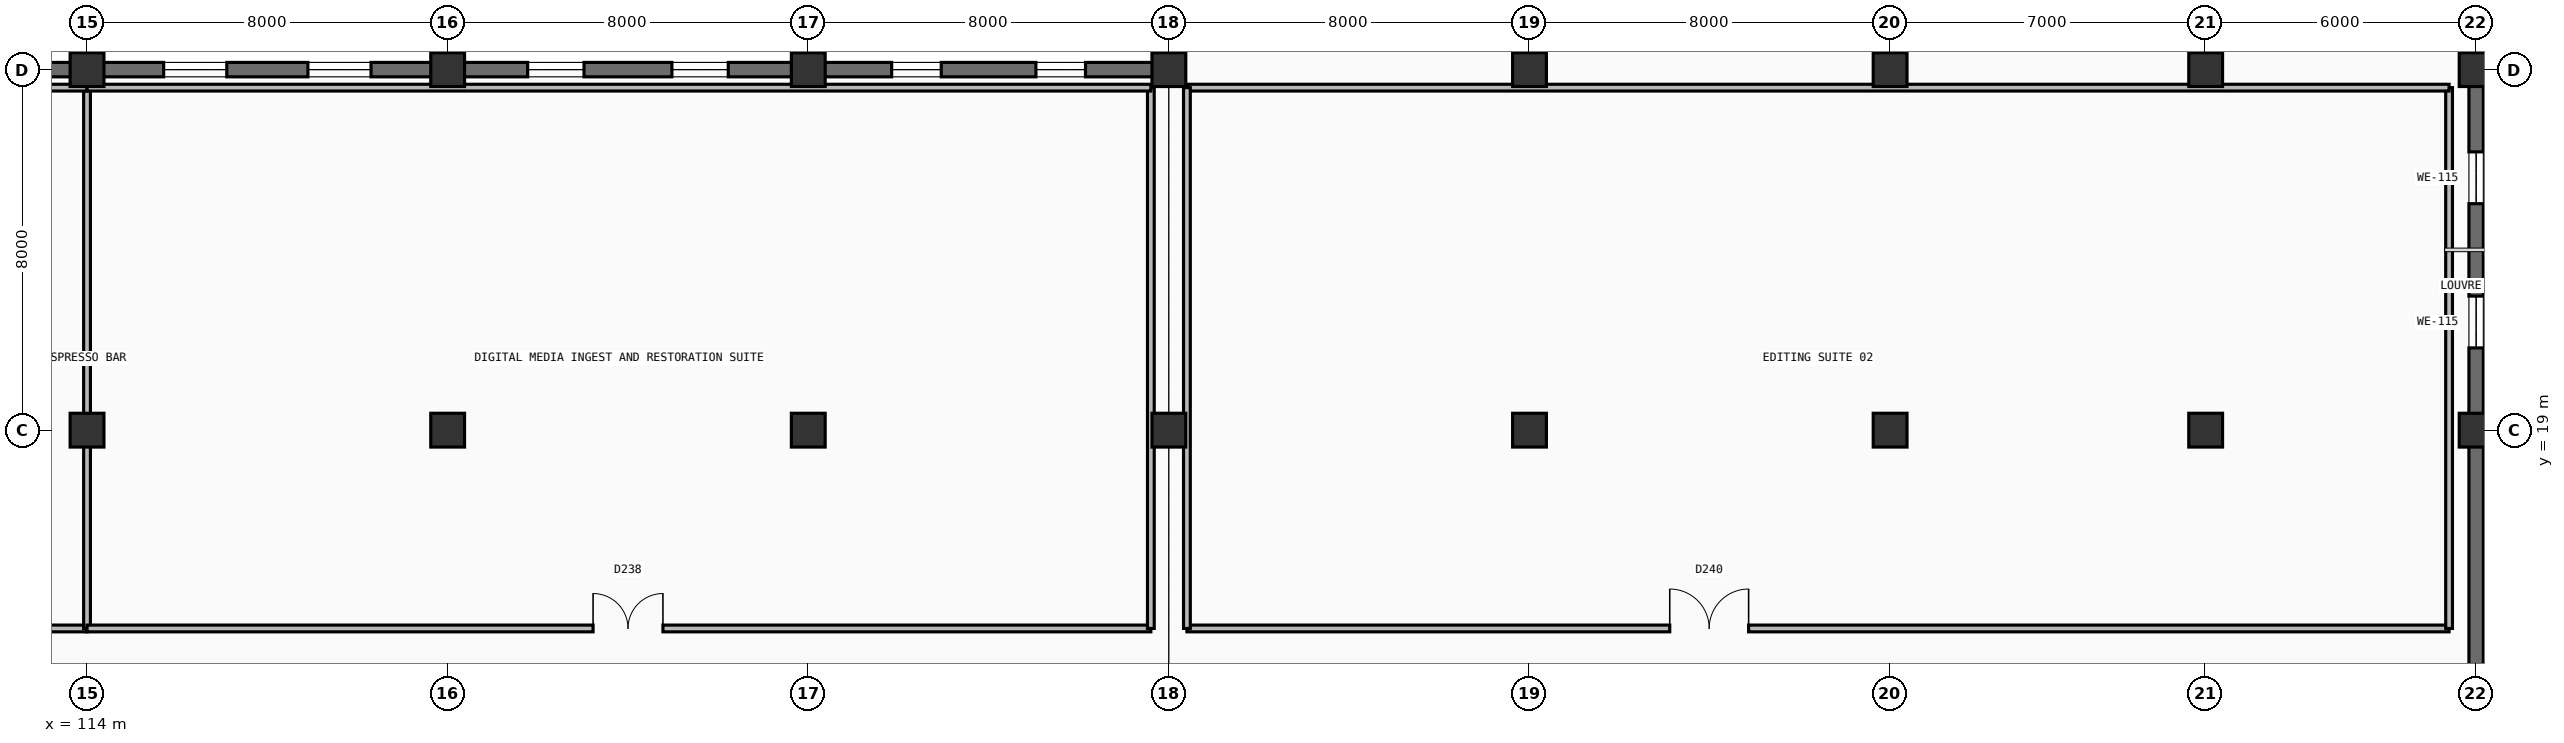
"""IFC4 building model, lengths in metres.
Left out: names, types, materials, properties, quantities, classifications, styles, units other than length and angle.
Written with IfcOpenShell. Run it as: python <this file> out.ifc"""

import sys

from ifc_helpers import new_model, si_unit, direction, frame, frame_2d, origin, origin_2d, place, context, subcontext, project, spatial, rectangle, extrude, element, fill, save


model = new_model("IFC4")
c1 = context("Model", 3, precision=1e-05, world=origin(), true_north=direction((0.0, 1.0)))
c2 = subcontext(c1, "Body", "Model", "MODEL_VIEW")
j1 = project(units=[si_unit("LENGTHUNIT", "METRE"), si_unit("PLANEANGLEUNIT", "RADIAN")], contexts=[c1])
p1 = place(None, origin())
s1 = spatial("IfcSite", under=j1, at=p1, CompositionType="ELEMENT")
p2 = place(p1, origin())
s2 = spatial("IfcBuilding", under=s1, at=p2, CompositionType="ELEMENT")
p3 = place(p2, origin())
s3 = spatial("IfcBuildingStorey", under=s2, at=p3, CompositionType="ELEMENT", Elevation=0.0)
for number, where, z_axis, x_axis in (
    (1, (114.0, 19.0, 0.0), (0.0, 0.0, 1.0), (1.0, 0.0, 0.0)),
    (2, (114.0, 27.0, 0.0), (0.0, 0.0, 1.0), (1.0, 0.0, 0.0)),
    (3, (122.0, 19.0, 0.0), (0.0, 0.0, 1.0), (1.0, 0.0, 0.0)),
    (4, (122.0, 27.0, 0.0), (0.0, 0.0, 1.0), (1.0, 0.0, 0.0)),
    (5, (130.0, 19.0, 0.0), (0.0, 0.0, 1.0), (1.0, 0.0, 0.0)),
    (6, (130.0, 27.0, 0.0), (0.0, 0.0, 1.0), (1.0, 0.0, 0.0)),
    (7, (138.0, 19.0, 0.0), (0.0, 0.0, 1.0), (1.0, 0.0, 0.0)),
    (8, (138.0, 27.0, 0.0), (0.0, 0.0, 1.0), (1.0, 0.0, 0.0)),
    (9, (146.0, 19.0, 0.0), (0.0, 0.0, 1.0), (1.0, 0.0, 0.0)),
    (10, (146.0, 27.0, 0.0), (0.0, 0.0, 1.0), (1.0, 0.0, 0.0)),
    (11, (154.0, 19.0, 0.0), (0.0, 0.0, 1.0), (1.0, 0.0, 0.0)),
    (12, (154.0, 27.0, 0.0), (0.0, 0.0, 1.0), (1.0, 0.0, 0.0)),
    (13, (161.0, 19.0, 0.0), (0.0, 0.0, 1.0), (1.0, 0.0, 0.0)),
    (14, (161.0, 27.0, 0.0), (0.0, 0.0, 1.0), (1.0, 0.0, 0.0)),
    (15, (167.0, 19.0, 0.0), (0.0, 0.0, 1.0), (1.0, 0.0, 0.0)),
    (16, (167.0, 27.0, 0.0), (0.0, 0.0, 1.0), (1.0, 0.0, 0.0)),
):
    element("IfcColumn", number, at=place(p3, frame(where, z_axis=z_axis, x_axis=x_axis)), inside=s3, PredefinedType="COLUMN", context=c2, shape_type="SweptSolid", body=[
        extrude(rectangle(XDim=0.75, YDim=0.75, at=origin_2d()), origin(), (0.0, 0.0, 1.0), 5.4),
    ])
p4 = place(p3, frame((106.0, 27.0, 0.0), z_axis=(0.0, 0.0, 1.0), x_axis=(1.0, 0.0, 0.0)))
e17 = element("IfcWall", 17, at=p4, inside=s3, PredefinedType="SOLIDWALL", context=c2, shape_type="SweptSolid", body=[
    extrude(rectangle(XDim=8.0, YDim=0.32, at=frame_2d((4.0, 0.0))), origin(), (0.0, 0.0, 1.0), 5.4),
])
p5 = place(p4, frame((1.625, 0.0, 1.0)))
e18 = element("IfcOpeningElement", 18, at=p5, cuts=e17, PredefinedType="OPENING", context=c2, shape_type="SweptSolid", body=[
    extrude(rectangle(XDim=1.55, YDim=1.95, at=frame_2d((0.775, 0.975))), frame((0.0, 0.17, 0.0), z_axis=(0.0, -1.0, 0.0), x_axis=(1.0, 0.0, 0.0)), (0.0, 0.0, 1.0), 0.34),
])
p6 = place(p4, frame((4.825, 0.0, 1.0)))
e19 = element("IfcOpeningElement", 19, at=p6, cuts=e17, PredefinedType="OPENING", context=c2, shape_type="SweptSolid", body=[
    extrude(rectangle(XDim=1.55, YDim=1.95, at=frame_2d((0.775, 0.975))), frame((0.0, 0.17, 0.0), z_axis=(0.0, -1.0, 0.0), x_axis=(1.0, 0.0, 0.0)), (0.0, 0.0, 1.0), 0.34),
])
p7 = place(p3, frame((114.0, 27.0, 0.0), z_axis=(0.0, 0.0, 1.0), x_axis=(1.0, 0.0, 0.0)))
e20 = element("IfcWall", 20, at=p7, inside=s3, PredefinedType="SOLIDWALL", context=c2, shape_type="SweptSolid", body=[
    extrude(rectangle(XDim=8.0, YDim=0.32, at=frame_2d((4.0, 0.0))), origin(), (0.0, 0.0, 1.0), 5.4),
])
p8 = place(p7, frame((1.7, 0.0, 1.0)))
e21 = element("IfcOpeningElement", 21, at=p8, cuts=e20, PredefinedType="OPENING", context=c2, shape_type="SweptSolid", body=[
    extrude(rectangle(XDim=1.4, YDim=1.75, at=frame_2d((0.7, 0.875))), frame((0.0, 0.17, 0.0), z_axis=(0.0, -1.0, 0.0), x_axis=(1.0, 0.0, 0.0)), (0.0, 0.0, 1.0), 0.34),
])
p9 = place(p7, frame((4.9, 0.0, 1.0)))
e22 = element("IfcOpeningElement", 22, at=p9, cuts=e20, PredefinedType="OPENING", context=c2, shape_type="SweptSolid", body=[
    extrude(rectangle(XDim=1.4, YDim=1.75, at=frame_2d((0.7, 0.875))), frame((0.0, 0.17, 0.0), z_axis=(0.0, -1.0, 0.0), x_axis=(1.0, 0.0, 0.0)), (0.0, 0.0, 1.0), 0.34),
])
p10 = place(p3, frame((122.0, 27.0, 0.0), z_axis=(0.0, 0.0, 1.0), x_axis=(1.0, 0.0, 0.0)))
e23 = element("IfcWall", 23, at=p10, inside=s3, PredefinedType="SOLIDWALL", context=c2, shape_type="SweptSolid", body=[
    extrude(rectangle(XDim=8.0, YDim=0.32, at=frame_2d((4.0, 0.0))), origin(), (0.0, 0.0, 1.0), 5.4),
])
p11 = place(p10, frame((1.775, 0.0, 1.0)))
e24 = element("IfcOpeningElement", 24, at=p11, cuts=e23, PredefinedType="OPENING", context=c2, shape_type="SweptSolid", body=[
    extrude(rectangle(XDim=1.25, YDim=1.6, at=frame_2d((0.625, 0.8))), frame((0.0, 0.17, 0.0), z_axis=(0.0, -1.0, 0.0), x_axis=(1.0, 0.0, 0.0)), (0.0, 0.0, 1.0), 0.34),
])
p12 = place(p10, frame((4.975, 0.0, 1.0)))
e25 = element("IfcOpeningElement", 25, at=p12, cuts=e23, PredefinedType="OPENING", context=c2, shape_type="SweptSolid", body=[
    extrude(rectangle(XDim=1.25, YDim=1.6, at=frame_2d((0.625, 0.8))), frame((0.0, 0.17, 0.0), z_axis=(0.0, -1.0, 0.0), x_axis=(1.0, 0.0, 0.0)), (0.0, 0.0, 1.0), 0.34),
])
p13 = place(p3, frame((130.0, 27.0, 0.0), z_axis=(0.0, 0.0, 1.0), x_axis=(1.0, 0.0, 0.0)))
e26 = element("IfcWall", 26, at=p13, inside=s3, PredefinedType="SOLIDWALL", context=c2, shape_type="SweptSolid", body=[
    extrude(rectangle(XDim=8.0, YDim=0.32, at=frame_2d((4.0, 0.0))), origin(), (0.0, 0.0, 1.0), 5.4),
])
p14 = place(p13, frame((1.85, 0.0, 1.0)))
e27 = element("IfcOpeningElement", 27, at=p14, cuts=e26, PredefinedType="OPENING", context=c2, shape_type="SweptSolid", body=[
    extrude(rectangle(XDim=1.1, YDim=1.45, at=frame_2d((0.55, 0.725))), frame((0.0, 0.17, 0.0), z_axis=(0.0, -1.0, 0.0), x_axis=(1.0, 0.0, 0.0)), (0.0, 0.0, 1.0), 0.34),
])
p15 = place(p13, frame((5.05, 0.0, 1.0)))
e28 = element("IfcOpeningElement", 28, at=p15, cuts=e26, PredefinedType="OPENING", context=c2, shape_type="SweptSolid", body=[
    extrude(rectangle(XDim=1.1, YDim=1.45, at=frame_2d((0.55, 0.725))), frame((0.0, 0.17, 0.0), z_axis=(0.0, -1.0, 0.0), x_axis=(1.0, 0.0, 0.0)), (0.0, 0.0, 1.0), 0.34),
])
p16 = place(p3, frame((138.0, 27.0, 0.0), z_axis=(0.0, 0.0, 1.0), x_axis=(0.0, 1.0, 0.0)))
e29 = element("IfcWall", 29, at=p16, inside=s3, PredefinedType="SOLIDWALL", context=c2, shape_type="SweptSolid", body=[
    extrude(rectangle(XDim=8.0, YDim=0.32, at=frame_2d((4.0, 0.0))), origin(), (0.0, 0.0, 1.0), 5.4),
])
p17 = place(p16, frame((1.975, 0.0, 1.0)))
e30 = element("IfcOpeningElement", 30, at=p17, cuts=e29, PredefinedType="OPENING", context=c2, shape_type="SweptSolid", body=[
    extrude(rectangle(XDim=0.85, YDim=1.2, at=frame_2d((0.425, 0.6))), frame((0.0, 0.17, 0.0), z_axis=(0.0, -1.0, 0.0), x_axis=(1.0, 0.0, 0.0)), (0.0, 0.0, 1.0), 0.34),
])
p18 = place(p16, frame((5.175, 0.0, 1.0)))
e31 = element("IfcOpeningElement", 31, at=p18, cuts=e29, PredefinedType="OPENING", context=c2, shape_type="SweptSolid", body=[
    extrude(rectangle(XDim=0.85, YDim=1.2, at=frame_2d((0.425, 0.6))), frame((0.0, 0.17, 0.0), z_axis=(0.0, -1.0, 0.0), x_axis=(1.0, 0.0, 0.0)), (0.0, 0.0, 1.0), 0.34),
])
p19 = place(p3, frame((167.0, 35.0, 0.0), z_axis=(0.0, 0.0, 1.0), x_axis=(0.0, -1.0, 0.0)))
e32 = element("IfcWall", 32, at=p19, inside=s3, PredefinedType="SOLIDWALL", context=c2, shape_type="SweptSolid", body=[
    extrude(rectangle(XDim=8.0, YDim=0.32, at=frame_2d((4.0, 0.0))), origin(), (0.0, 0.0, 1.0), 5.4),
])
p20 = place(p19, frame((0.7, 0.0, 0.0)))
e33 = element("IfcOpeningElement", 33, at=p20, cuts=e32, PredefinedType="OPENING", context=c2, shape_type="SweptSolid", body=[
    extrude(rectangle(XDim=6.6, YDim=3.6, at=frame_2d((3.3, 1.8))), frame((0.0, 0.17, 0.0), z_axis=(0.0, -1.0, 0.0), x_axis=(1.0, 0.0, 0.0)), (0.0, 0.0, 1.0), 0.34),
])
p21 = place(p3, frame((167.0, 27.0, 0.0), z_axis=(0.0, 0.0, 1.0), x_axis=(0.0, -1.0, 0.0)))
e34 = element("IfcWall", 34, at=p21, inside=s3, PredefinedType="SOLIDWALL", context=c2, shape_type="SweptSolid", body=[
    extrude(rectangle(XDim=8.0, YDim=0.32, at=frame_2d((4.0, 0.0))), origin(), (0.0, 0.0, 1.0), 5.4),
])
p22 = place(p21, frame((1.825, 0.0, 1.0)))
e35 = element("IfcOpeningElement", 35, at=p22, cuts=e34, PredefinedType="OPENING", context=c2, shape_type="SweptSolid", body=[
    extrude(rectangle(XDim=1.15, YDim=1.55, at=frame_2d((0.575, 0.775))), frame((0.0, 0.17, 0.0), z_axis=(0.0, -1.0, 0.0), x_axis=(1.0, 0.0, 0.0)), (0.0, 0.0, 1.0), 0.34),
])
p23 = place(p21, frame((5.025, 0.0, 1.0)))
e36 = element("IfcOpeningElement", 36, at=p23, cuts=e34, PredefinedType="OPENING", context=c2, shape_type="SweptSolid", body=[
    extrude(rectangle(XDim=1.15, YDim=1.55, at=frame_2d((0.575, 0.775))), frame((0.0, 0.17, 0.0), z_axis=(0.0, -1.0, 0.0), x_axis=(1.0, 0.0, 0.0)), (0.0, 0.0, 1.0), 0.34),
])
p24 = place(p3, frame((167.0, 19.0, 0.0), z_axis=(0.0, 0.0, 1.0), x_axis=(0.0, -1.0, 0.0)))
e37 = element("IfcWall", 37, at=p24, inside=s3, PredefinedType="SOLIDWALL", context=c2, shape_type="SweptSolid", body=[
    extrude(rectangle(XDim=8.0, YDim=0.32, at=frame_2d((4.0, 0.0))), origin(), (0.0, 0.0, 1.0), 5.4),
])
p25 = place(p24, frame((5.2, 0.0, 0.0)))
e38 = element("IfcOpeningElement", 38, at=p25, cuts=e37, PredefinedType="OPENING", context=c2, shape_type="SweptSolid", body=[
    extrude(rectangle(XDim=2.0, YDim=2.6, at=frame_2d((1.0, 1.3))), frame((0.0, 0.17, 0.0), z_axis=(0.0, -1.0, 0.0), x_axis=(1.0, 0.0, 0.0)), (0.0, 0.0, 1.0), 0.34),
])
p26 = place(p3, frame((82.4, 14.6, 0.0), z_axis=(0.0, 0.0, 1.0), x_axis=(1.0, 0.0, 0.0)))
e39 = element("IfcWall", 39, at=p26, inside=s3, PredefinedType="PARTITIONING", context=c2, shape_type="SweptSolid", body=[
    extrude(rectangle(XDim=31.6, YDim=0.15, at=frame_2d((15.8, 0.0))), origin(), (0.0, 0.0, 1.0), 5.1),
])
p27 = place(p26, frame((18.694, 0.0, 0.0)))
e40 = element("IfcOpeningElement", 40, at=p27, cuts=e39, PredefinedType="OPENING", context=c2, shape_type="SweptSolid", body=[
    extrude(rectangle(XDim=1.65, YDim=2.3, at=frame_2d((0.825, 1.15))), frame((0.0, 0.085, 0.0), z_axis=(0.0, -1.0, 0.0), x_axis=(1.0, 0.0, 0.0)), (0.0, 0.0, 1.0), 0.17),
])
p28 = place(p3, frame((114.0, 14.6, 0.0), z_axis=(0.0, 0.0, 1.0), x_axis=(0.0, 1.0, 0.0)))
e41 = element("IfcWall", 41, at=p28, inside=s3, PredefinedType="PARTITIONING", context=c2, shape_type="SweptSolid", body=[
    extrude(rectangle(XDim=12.0, YDim=0.15, at=frame_2d((6.0, 0.0))), origin(), (0.0, 0.0, 1.0), 4.385),
])
p29 = place(p3, frame((82.4, 26.6, 0.0), z_axis=(0.0, 0.0, 1.0), x_axis=(1.0, 0.0, 0.0)))
e42 = element("IfcWall", 42, at=p29, inside=s3, PredefinedType="PARTITIONING", context=c2, shape_type="SweptSolid", body=[
    extrude(rectangle(XDim=31.6, YDim=0.15, at=frame_2d((15.8, 0.0))), origin(), (0.0, 0.0, 1.0), 4.405),
])
p30 = place(p3, frame((114.0, 14.6, 0.0), z_axis=(0.0, 0.0, 1.0), x_axis=(1.0, 0.0, 0.0)))
e43 = element("IfcWall", 43, at=p30, inside=s3, PredefinedType="PARTITIONING", context=c2, shape_type="SweptSolid", body=[
    extrude(rectangle(XDim=23.6, YDim=0.15, at=frame_2d((11.8, 0.0))), origin(), (0.0, 0.0, 1.0), 5.1),
])
p31 = place(p30, frame((11.226, 0.0, 0.0)))
e44 = element("IfcOpeningElement", 44, at=p31, cuts=e43, PredefinedType="OPENING", context=c2, shape_type="SweptSolid", body=[
    extrude(rectangle(XDim=1.55, YDim=2.25, at=frame_2d((0.775, 1.125))), frame((0.0, 0.085, 0.0), z_axis=(0.0, -1.0, 0.0), x_axis=(1.0, 0.0, 0.0)), (0.0, 0.0, 1.0), 0.17),
])
p32 = place(p3, frame((137.6, 14.6, 0.0), z_axis=(0.0, 0.0, 1.0), x_axis=(0.0, 1.0, 0.0)))
e45 = element("IfcWall", 45, at=p32, inside=s3, PredefinedType="PARTITIONING", context=c2, shape_type="SweptSolid", body=[
    extrude(rectangle(XDim=12.0, YDim=0.15, at=frame_2d((6.0, 0.0))), origin(), (0.0, 0.0, 1.0), 4.385),
])
p33 = place(p3, frame((114.0, 26.6, 0.0), z_axis=(0.0, 0.0, 1.0), x_axis=(1.0, 0.0, 0.0)))
e46 = element("IfcWall", 46, at=p33, inside=s3, PredefinedType="PARTITIONING", context=c2, shape_type="SweptSolid", body=[
    extrude(rectangle(XDim=23.6, YDim=0.15, at=frame_2d((11.8, 0.0))), origin(), (0.0, 0.0, 1.0), 4.405),
])
p34 = place(p3, frame((138.4, 14.6, 0.0), z_axis=(0.0, 0.0, 1.0), x_axis=(1.0, 0.0, 0.0)))
e47 = element("IfcWall", 47, at=p34, inside=s3, PredefinedType="PARTITIONING", context=c2, shape_type="SweptSolid", body=[
    extrude(rectangle(XDim=28.0, YDim=0.15, at=frame_2d((14.0, 0.0))), origin(), (0.0, 0.0, 1.0), 5.1),
])
p35 = place(p34, frame((10.711, 0.0, 0.0)))
e48 = element("IfcOpeningElement", 48, at=p35, cuts=e47, PredefinedType="OPENING", context=c2, shape_type="SweptSolid", body=[
    extrude(rectangle(XDim=1.75, YDim=2.3, at=frame_2d((0.875, 1.15))), frame((0.0, 0.085, 0.0), z_axis=(0.0, -1.0, 0.0), x_axis=(1.0, 0.0, 0.0)), (0.0, 0.0, 1.0), 0.17),
])
p36 = place(p3, frame((166.4, 14.6, 0.0), z_axis=(0.0, 0.0, 1.0), x_axis=(0.0, 1.0, 0.0)))
e49 = element("IfcWall", 49, at=p36, inside=s3, PredefinedType="PARTITIONING", context=c2, shape_type="SweptSolid", body=[
    extrude(rectangle(XDim=12.0, YDim=0.15, at=frame_2d((6.0, 0.0))), origin(), (0.0, 0.0, 1.0), 5.1),
])
p37 = place(p3, frame((138.4, 26.6, 0.0), z_axis=(0.0, 0.0, 1.0), x_axis=(1.0, 0.0, 0.0)))
e50 = element("IfcWall", 50, at=p37, inside=s3, PredefinedType="PARTITIONING", context=c2, shape_type="SweptSolid", body=[
    extrude(rectangle(XDim=28.0, YDim=0.15, at=frame_2d((14.0, 0.0))), origin(), (0.0, 0.0, 1.0), 4.405),
])
p38 = place(p3, frame((138.4, 14.6, 0.0), z_axis=(0.0, 0.0, 1.0), x_axis=(0.0, 1.0, 0.0)))
e51 = element("IfcWall", 51, at=p38, inside=s3, PredefinedType="PARTITIONING", context=c2, shape_type="SweptSolid", body=[
    extrude(rectangle(XDim=12.0, YDim=0.15, at=frame_2d((6.0, 0.0))), origin(), (0.0, 0.0, 1.0), 4.385),
])
p39 = place(p8, origin())
e52 = element("IfcWindow", 52, at=p39, inside=s3, PartitioningType="SINGLE_PANEL", PredefinedType="WINDOW", context=c2, shape_type="SweptSolid", body=[
    extrude(rectangle(XDim=1.4, YDim=1.75, at=frame_2d((0.7, 0.875))), frame((0.0, 0.03, 0.0), z_axis=(0.0, -1.0, 0.0), x_axis=(1.0, 0.0, 0.0)), (0.0, 0.0, 1.0), 0.06),
])
fill(e21, e52)
p40 = place(p9, origin())
e53 = element("IfcWindow", 53, at=p40, inside=s3, PartitioningType="SINGLE_PANEL", PredefinedType="WINDOW", context=c2, shape_type="SweptSolid", body=[
    extrude(rectangle(XDim=1.4, YDim=1.75, at=frame_2d((0.7, 0.875))), frame((0.0, 0.03, 0.0), z_axis=(0.0, -1.0, 0.0), x_axis=(1.0, 0.0, 0.0)), (0.0, 0.0, 1.0), 0.06),
])
fill(e22, e53)
p41 = place(p11, origin())
e54 = element("IfcWindow", 54, at=p41, inside=s3, PartitioningType="SINGLE_PANEL", PredefinedType="WINDOW", context=c2, shape_type="SweptSolid", body=[
    extrude(rectangle(XDim=1.25, YDim=1.6, at=frame_2d((0.625, 0.8))), frame((0.0, 0.03, 0.0), z_axis=(0.0, -1.0, 0.0), x_axis=(1.0, 0.0, 0.0)), (0.0, 0.0, 1.0), 0.06),
])
fill(e24, e54)
p42 = place(p12, origin())
e55 = element("IfcWindow", 55, at=p42, inside=s3, PartitioningType="SINGLE_PANEL", PredefinedType="WINDOW", context=c2, shape_type="SweptSolid", body=[
    extrude(rectangle(XDim=1.25, YDim=1.6, at=frame_2d((0.625, 0.8))), frame((0.0, 0.03, 0.0), z_axis=(0.0, -1.0, 0.0), x_axis=(1.0, 0.0, 0.0)), (0.0, 0.0, 1.0), 0.06),
])
fill(e25, e55)
p43 = place(p14, origin())
e56 = element("IfcWindow", 56, at=p43, inside=s3, PartitioningType="SINGLE_PANEL", PredefinedType="WINDOW", context=c2, shape_type="SweptSolid", body=[
    extrude(rectangle(XDim=1.1, YDim=1.45, at=frame_2d((0.55, 0.725))), frame((0.0, 0.03, 0.0), z_axis=(0.0, -1.0, 0.0), x_axis=(1.0, 0.0, 0.0)), (0.0, 0.0, 1.0), 0.06),
])
fill(e27, e56)
p44 = place(p15, origin())
e57 = element("IfcWindow", 57, at=p44, inside=s3, PartitioningType="SINGLE_PANEL", PredefinedType="WINDOW", context=c2, shape_type="SweptSolid", body=[
    extrude(rectangle(XDim=1.1, YDim=1.45, at=frame_2d((0.55, 0.725))), frame((0.0, 0.03, 0.0), z_axis=(0.0, -1.0, 0.0), x_axis=(1.0, 0.0, 0.0)), (0.0, 0.0, 1.0), 0.06),
])
fill(e28, e57)
p45 = place(p22, origin())
e58 = element("IfcWindow", 58, at=p45, inside=s3, PartitioningType="SINGLE_PANEL", PredefinedType="WINDOW", context=c2, shape_type="SweptSolid", body=[
    extrude(rectangle(XDim=1.15, YDim=1.55, at=frame_2d((0.575, 0.775))), frame((0.0, 0.03, 0.0), z_axis=(0.0, -1.0, 0.0), x_axis=(1.0, 0.0, 0.0)), (0.0, 0.0, 1.0), 0.06),
])
fill(e35, e58)
p46 = place(p23, origin())
e59 = element("IfcWindow", 59, at=p46, inside=s3, PartitioningType="SINGLE_PANEL", PredefinedType="WINDOW", context=c2, shape_type="SweptSolid", body=[
    extrude(rectangle(XDim=1.15, YDim=1.55, at=frame_2d((0.575, 0.775))), frame((0.0, 0.03, 0.0), z_axis=(0.0, -1.0, 0.0), x_axis=(1.0, 0.0, 0.0)), (0.0, 0.0, 1.0), 0.06),
])
fill(e36, e59)
p47 = place(p31, origin())
e60 = element("IfcDoor", 60, at=p47, inside=s3, OperationType="DOUBLE_DOOR_SINGLE_SWING", PredefinedType="DOOR", context=c2, shape_type="SweptSolid", body=[
    extrude(rectangle(XDim=1.55, YDim=2.25, at=frame_2d((0.775, 1.125))), frame((0.0, 0.025, 0.0), z_axis=(0.0, -1.0, 0.0), x_axis=(1.0, 0.0, 0.0)), (0.0, 0.0, 1.0), 0.05),
])
fill(e44, e60)
p48 = place(p35, origin())
e61 = element("IfcDoor", 61, at=p48, inside=s3, OperationType="DOUBLE_DOOR_SINGLE_SWING", PredefinedType="DOOR", context=c2, shape_type="SweptSolid", body=[
    extrude(rectangle(XDim=1.75, YDim=2.3, at=frame_2d((0.875, 1.15))), frame((0.0, 0.025, 0.0), z_axis=(0.0, -1.0, 0.0), x_axis=(1.0, 0.0, 0.0)), (0.0, 0.0, 1.0), 0.05),
])
fill(e48, e61)
save(model, sys.argv[1])
